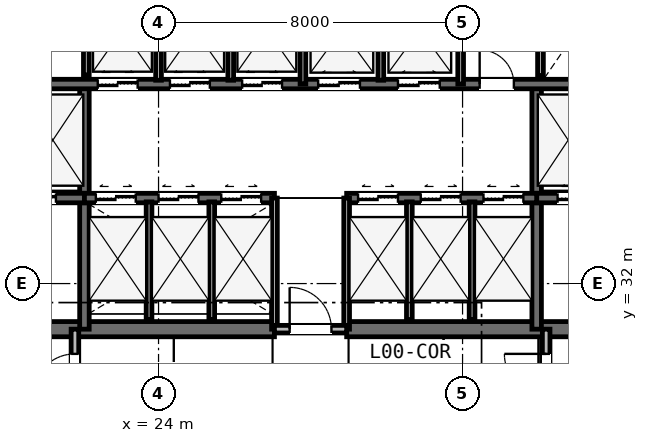
"""IFC4 building model, lengths in metres.
Left out: names, types, materials, properties, quantities, classifications, styles, units other than length and angle.
Written with IfcOpenShell. Run it as: python <this file> out.ifc"""

import sys

from ifc_helpers import new_model, si_unit, direction, frame, frame_2d, origin, place, context, subcontext, project, spatial, rectangle, extrude, element, fill, save


model = new_model("IFC4")
c1 = context("Model", 3, precision=1e-05, world=origin(), true_north=direction((0.0, 1.0)))
c2 = subcontext(c1, "Body", "Model", "MODEL_VIEW")
j1 = project(units=[si_unit("LENGTHUNIT", "METRE"), si_unit("PLANEANGLEUNIT", "RADIAN")], contexts=[c1])
p1 = place(None, origin())
s1 = spatial("IfcSite", under=j1, at=p1, CompositionType="ELEMENT")
p2 = place(p1, origin())
s2 = spatial("IfcBuilding", under=s1, at=p2, CompositionType="ELEMENT")
p3 = place(p2, origin())
s3 = spatial("IfcBuildingStorey", under=s2, at=p3, CompositionType="ELEMENT", Elevation=0.0)
p4 = place(p3, frame((15.85, 30.8, 0.0), z_axis=(0.0, 0.0, 1.0), x_axis=(1.0, 0.0, 0.0)))
e1 = element("IfcWall", 1, at=p4, inside=s3, PredefinedType="SHEAR", context=c2, shape_type="SweptSolid", body=[
    extrude(rectangle(XDim=11.2, YDim=0.4, at=frame_2d((5.6, 0.0))), origin(), (0.0, 0.0, 1.0), 6.0),
])
p5 = place(p4, frame((2.45, 0.0, 0.0)))
e2 = element("IfcOpeningElement", 2, at=p5, cuts=e1, PredefinedType="OPENING", context=c2, shape_type="SweptSolid", body=[
    extrude(rectangle(XDim=1.1, YDim=2.15, at=frame_2d((0.55, 1.075))), frame((0.0, 0.21, 0.0), z_axis=(0.0, -1.0, 0.0), x_axis=(1.0, 0.0, 0.0)), (0.0, 0.0, 1.0), 0.42),
])
p6 = place(p3, frame((28.95, 30.8, 0.0), z_axis=(0.0, 0.0, 1.0), x_axis=(1.0, 0.0, 0.0)))
e3 = element("IfcWall", 3, at=p6, inside=s3, PredefinedType="SHEAR", context=c2, shape_type="SweptSolid", body=[
    extrude(rectangle(XDim=11.2, YDim=0.4, at=frame_2d((5.6, 0.0))), origin(), (0.0, 0.0, 1.0), 6.0),
])
p7 = place(p6, frame((7.65, 0.0, 0.0)))
e4 = element("IfcOpeningElement", 4, at=p7, cuts=e3, PredefinedType="OPENING", context=c2, shape_type="SweptSolid", body=[
    extrude(rectangle(XDim=1.1, YDim=2.15, at=frame_2d((0.55, 1.075))), frame((0.0, 0.21, 0.0), z_axis=(0.0, -1.0, 0.0), x_axis=(1.0, 0.0, 0.0)), (0.0, 0.0, 1.0), 0.42),
])
for number, where, z_axis, x_axis in (
    (5, (22.05, 30.8, 0.0), (0.0, 0.0, 1.0), (0.0, 1.0, 0.0)),
    (6, (33.95, 30.8, 0.0), (0.0, 0.0, 1.0), (0.0, 1.0, 0.0)),
):
    element("IfcWall", number, at=place(p3, frame(where, z_axis=z_axis, x_axis=x_axis)), inside=s3, PredefinedType="SHEAR", context=c2, shape_type="SweptSolid", body=[
        extrude(rectangle(XDim=6.45, YDim=0.25, at=frame_2d((3.225, 0.0))), origin(), (0.0, 0.0, 1.0), 6.0),
    ])
p8 = place(p3, frame((16.0, 34.25, 0.0), z_axis=(0.0, 0.0, 1.0), x_axis=(1.0, 0.0, 0.0)))
e7 = element("IfcWall", 7, at=p8, inside=s3, PredefinedType="SHEAR", context=c2, shape_type="SweptSolid", body=[
    extrude(rectangle(XDim=6.05, YDim=0.25, at=frame_2d((3.025, 0.0))), origin(), (0.0, 0.0, 1.0), 6.0),
])
p9 = place(p8, frame((1.25, 0.0, 0.0)))
e8 = element("IfcOpeningElement", 8, at=p9, cuts=e7, PredefinedType="OPENING", context=c2, shape_type="SweptSolid", body=[
    extrude(rectangle(XDim=1.0, YDim=2.15, at=frame_2d((0.5, 1.075))), frame((0.0, 0.135, 0.0), z_axis=(0.0, -1.0, 0.0), x_axis=(1.0, 0.0, 0.0)), (0.0, 0.0, 1.0), 0.27),
])
p10 = place(p8, frame((4.2, 0.0, 0.0)))
e9 = element("IfcOpeningElement", 9, at=p10, cuts=e7, PredefinedType="OPENING", context=c2, shape_type="SweptSolid", body=[
    extrude(rectangle(XDim=1.1, YDim=2.15, at=frame_2d((0.55, 1.075))), frame((0.0, 0.135, 0.0), z_axis=(0.0, -1.0, 0.0), x_axis=(1.0, 0.0, 0.0)), (0.0, 0.0, 1.0), 0.27),
])
p11 = place(p3, frame((33.95, 34.25, 0.0), z_axis=(0.0, 0.0, 1.0), x_axis=(1.0, 0.0, 0.0)))
e10 = element("IfcWall", 10, at=p11, inside=s3, PredefinedType="SHEAR", context=c2, shape_type="SweptSolid", body=[
    extrude(rectangle(XDim=6.05, YDim=0.25, at=frame_2d((3.025, 0.0))), origin(), (0.0, 0.0, 1.0), 6.0),
])
p12 = place(p11, frame((3.7, 0.0, 0.0)))
e11 = element("IfcOpeningElement", 11, at=p12, cuts=e10, PredefinedType="OPENING", context=c2, shape_type="SweptSolid", body=[
    extrude(rectangle(XDim=1.0, YDim=2.15, at=frame_2d((0.5, 1.075))), frame((0.0, 0.135, 0.0), z_axis=(0.0, -1.0, 0.0), x_axis=(1.0, 0.0, 0.0)), (0.0, 0.0, 1.0), 0.27),
])
p13 = place(p11, frame((0.55, 0.0, 0.0)))
e12 = element("IfcOpeningElement", 12, at=p13, cuts=e10, PredefinedType="OPENING", context=c2, shape_type="SweptSolid", body=[
    extrude(rectangle(XDim=1.1, YDim=2.15, at=frame_2d((0.55, 1.075))), frame((0.0, 0.135, 0.0), z_axis=(0.0, -1.0, 0.0), x_axis=(1.0, 0.0, 0.0)), (0.0, 0.0, 1.0), 0.27),
])
p14 = place(p3, frame((22.05, 34.25, 0.0), z_axis=(0.0, 0.0, 1.0), x_axis=(1.0, 0.0, 0.0)))
e13 = element("IfcWall", 13, at=p14, inside=s3, PredefinedType="SHEAR", context=c2, shape_type="SweptSolid", body=[
    extrude(rectangle(XDim=5.0, YDim=0.25, at=frame_2d((2.5, 0.0))), origin(), (0.0, 0.0, 1.0), 6.0),
])
p15 = place(p14, frame((0.3, 0.0, 0.0)))
e14 = element("IfcOpeningElement", 14, at=p15, cuts=e13, PredefinedType="OPENING", context=c2, shape_type="SweptSolid", body=[
    extrude(rectangle(XDim=1.05, YDim=2.15, at=frame_2d((0.525, 1.075))), frame((0.0, 0.135, 0.0), z_axis=(0.0, -1.0, 0.0), x_axis=(1.0, 0.0, 0.0)), (0.0, 0.0, 1.0), 0.27),
])
p16 = place(p14, frame((1.95, 0.0, 0.0)))
e15 = element("IfcOpeningElement", 15, at=p16, cuts=e13, PredefinedType="OPENING", context=c2, shape_type="SweptSolid", body=[
    extrude(rectangle(XDim=1.05, YDim=2.15, at=frame_2d((0.525, 1.075))), frame((0.0, 0.135, 0.0), z_axis=(0.0, -1.0, 0.0), x_axis=(1.0, 0.0, 0.0)), (0.0, 0.0, 1.0), 0.27),
])
p17 = place(p14, frame((3.6, 0.0, 0.0)))
e16 = element("IfcOpeningElement", 16, at=p17, cuts=e13, PredefinedType="OPENING", context=c2, shape_type="SweptSolid", body=[
    extrude(rectangle(XDim=1.05, YDim=2.15, at=frame_2d((0.525, 1.075))), frame((0.0, 0.135, 0.0), z_axis=(0.0, -1.0, 0.0), x_axis=(1.0, 0.0, 0.0)), (0.0, 0.0, 1.0), 0.27),
])
p18 = place(p3, frame((28.95, 34.25, 0.0), z_axis=(0.0, 0.0, 1.0), x_axis=(1.0, 0.0, 0.0)))
e17 = element("IfcWall", 17, at=p18, inside=s3, PredefinedType="SHEAR", context=c2, shape_type="SweptSolid", body=[
    extrude(rectangle(XDim=5.0, YDim=0.25, at=frame_2d((2.5, 0.0))), origin(), (0.0, 0.0, 1.0), 6.0),
])
p19 = place(p18, frame((0.3, 0.0, 0.0)))
e18 = element("IfcOpeningElement", 18, at=p19, cuts=e17, PredefinedType="OPENING", context=c2, shape_type="SweptSolid", body=[
    extrude(rectangle(XDim=1.05, YDim=2.15, at=frame_2d((0.525, 1.075))), frame((0.0, 0.135, 0.0), z_axis=(0.0, -1.0, 0.0), x_axis=(1.0, 0.0, 0.0)), (0.0, 0.0, 1.0), 0.27),
])
p20 = place(p18, frame((1.95, 0.0, 0.0)))
e19 = element("IfcOpeningElement", 19, at=p20, cuts=e17, PredefinedType="OPENING", context=c2, shape_type="SweptSolid", body=[
    extrude(rectangle(XDim=1.05, YDim=2.15, at=frame_2d((0.525, 1.075))), frame((0.0, 0.135, 0.0), z_axis=(0.0, -1.0, 0.0), x_axis=(1.0, 0.0, 0.0)), (0.0, 0.0, 1.0), 0.27),
])
p21 = place(p18, frame((3.6, 0.0, 0.0)))
e20 = element("IfcOpeningElement", 20, at=p21, cuts=e17, PredefinedType="OPENING", context=c2, shape_type="SweptSolid", body=[
    extrude(rectangle(XDim=1.05, YDim=2.15, at=frame_2d((0.525, 1.075))), frame((0.0, 0.135, 0.0), z_axis=(0.0, -1.0, 0.0), x_axis=(1.0, 0.0, 0.0)), (0.0, 0.0, 1.0), 0.27),
])
p22 = place(p3, frame((19.9, 37.25, 0.0), z_axis=(0.0, 0.0, 1.0), x_axis=(1.0, 0.0, 0.0)))
e21 = element("IfcWall", 21, at=p22, inside=s3, PredefinedType="SHEAR", context=c2, shape_type="SweptSolid", body=[
    extrude(rectangle(XDim=16.2, YDim=0.25, at=frame_2d((8.1, 0.0))), origin(), (0.0, 0.0, 1.0), 6.0),
])
p23 = place(p22, frame((12.55, 0.0, 0.0)))
e22 = element("IfcOpeningElement", 22, at=p23, cuts=e21, PredefinedType="OPENING", context=c2, shape_type="SweptSolid", body=[
    extrude(rectangle(XDim=0.9, YDim=2.15, at=frame_2d((0.45, 1.075))), frame((0.0, 0.135, 0.0), z_axis=(0.0, -1.0, 0.0), x_axis=(1.0, 0.0, 0.0)), (0.0, 0.0, 1.0), 0.27),
])
p24 = place(p22, frame((2.5, 0.0, 0.0)))
e23 = element("IfcOpeningElement", 23, at=p24, cuts=e21, PredefinedType="OPENING", context=c2, shape_type="SweptSolid", body=[
    extrude(rectangle(XDim=1.05, YDim=2.15, at=frame_2d((0.525, 1.075))), frame((0.0, 0.135, 0.0), z_axis=(0.0, -1.0, 0.0), x_axis=(1.0, 0.0, 0.0)), (0.0, 0.0, 1.0), 0.27),
])
p25 = place(p22, frame((4.4, 0.0, 0.0)))
e24 = element("IfcOpeningElement", 24, at=p25, cuts=e21, PredefinedType="OPENING", context=c2, shape_type="SweptSolid", body=[
    extrude(rectangle(XDim=1.05, YDim=2.15, at=frame_2d((0.525, 1.075))), frame((0.0, 0.135, 0.0), z_axis=(0.0, -1.0, 0.0), x_axis=(1.0, 0.0, 0.0)), (0.0, 0.0, 1.0), 0.27),
])
p26 = place(p22, frame((6.3, 0.0, 0.0)))
e25 = element("IfcOpeningElement", 25, at=p26, cuts=e21, PredefinedType="OPENING", context=c2, shape_type="SweptSolid", body=[
    extrude(rectangle(XDim=1.05, YDim=2.15, at=frame_2d((0.525, 1.075))), frame((0.0, 0.135, 0.0), z_axis=(0.0, -1.0, 0.0), x_axis=(1.0, 0.0, 0.0)), (0.0, 0.0, 1.0), 0.27),
])
p27 = place(p22, frame((8.3, 0.0, 0.0)))
e26 = element("IfcOpeningElement", 26, at=p27, cuts=e21, PredefinedType="OPENING", context=c2, shape_type="SweptSolid", body=[
    extrude(rectangle(XDim=1.1, YDim=2.15, at=frame_2d((0.55, 1.075))), frame((0.0, 0.135, 0.0), z_axis=(0.0, -1.0, 0.0), x_axis=(1.0, 0.0, 0.0)), (0.0, 0.0, 1.0), 0.27),
])
p28 = place(p22, frame((10.4, 0.0, 0.0)))
e27 = element("IfcOpeningElement", 27, at=p28, cuts=e21, PredefinedType="OPENING", context=c2, shape_type="SweptSolid", body=[
    extrude(rectangle(XDim=1.1, YDim=2.15, at=frame_2d((0.55, 1.075))), frame((0.0, 0.135, 0.0), z_axis=(0.0, -1.0, 0.0), x_axis=(1.0, 0.0, 0.0)), (0.0, 0.0, 1.0), 0.27),
])
for number, where, z_axis, x_axis in (
    (28, (27.05, 30.8, 0.0), (0.0, 0.0, 1.0), (0.0, 1.0, 0.0)),
    (29, (28.95, 30.8, 0.0), (0.0, 0.0, 1.0), (0.0, 1.0, 0.0)),
):
    element("IfcWall", number, at=place(p3, frame(where, z_axis=z_axis, x_axis=x_axis)), inside=s3, PredefinedType="PLUMBINGWALL", context=c2, shape_type="SweptSolid", body=[
        extrude(rectangle(XDim=3.45, YDim=0.15, at=frame_2d((1.725, 0.0))), origin(), (0.0, 0.0, 1.0), 5.41),
    ])
p29 = place(p3, frame((27.05, 30.8, 0.0), z_axis=(0.0, 0.0, 1.0), x_axis=(1.0, 0.0, 0.0)))
e30 = element("IfcWall", 30, at=p29, inside=s3, PredefinedType="PARTITIONING", context=c2, shape_type="SweptSolid", body=[
    extrude(rectangle(XDim=1.9, YDim=0.2, at=frame_2d((0.95, 0.0))), origin(), (0.0, 0.0, 1.0), 5.41),
])
p30 = place(p29, frame((0.4, 0.0, 0.0)))
e31 = element("IfcOpeningElement", 31, at=p30, cuts=e30, PredefinedType="OPENING", context=c2, shape_type="SweptSolid", body=[
    extrude(rectangle(XDim=1.1, YDim=2.15, at=frame_2d((0.55, 1.075))), frame((0.0, 0.11, 0.0), z_axis=(0.0, -1.0, 0.0), x_axis=(1.0, 0.0, 0.0)), (0.0, 0.0, 1.0), 0.22),
])
for number, where, z_axis, x_axis in (
    (32, (23.75, 31.05, 0.0), (0.0, 0.0, 1.0), (0.0, 1.0, 0.0)),
    (33, (25.4, 31.05, 0.0), (0.0, 0.0, 1.0), (0.0, 1.0, 0.0)),
    (34, (30.6, 31.05, 0.0), (0.0, 0.0, 1.0), (0.0, 1.0, 0.0)),
    (35, (32.25, 31.05, 0.0), (0.0, 0.0, 1.0), (0.0, 1.0, 0.0)),
):
    element("IfcWall", number, at=place(p3, frame(where, z_axis=z_axis, x_axis=x_axis)), inside=s3, PredefinedType="PLUMBINGWALL", context=c2, shape_type="SweptSolid", body=[
        extrude(rectangle(XDim=3.1, YDim=0.15, at=frame_2d((1.55, 0.0))), origin(), (0.0, 0.0, 1.0), 5.67),
    ])
p31 = place(p3, frame((22.1, 37.49, 0.0), z_axis=(0.0, 0.0, 1.0), x_axis=(0.0, 1.0, 0.0)))
e36 = element("IfcWall", 36, at=p31, inside=s3, PredefinedType="PLUMBINGWALL", context=c2, shape_type="SweptSolid", body=[
    extrude(rectangle(XDim=2.56, YDim=0.15, at=frame_2d((1.28, 0.0))), origin(), (0.0, 0.0, 1.0), 5.67),
])
p32 = place(p3, frame((27.8, 37.25, 0.0), z_axis=(0.0, 0.0, 1.0), x_axis=(0.0, 1.0, 0.0)))
e37 = element("IfcWall", 37, at=p32, inside=s3, PredefinedType="PLUMBINGWALL", context=c2, shape_type="SweptSolid", body=[
    extrude(rectangle(XDim=2.8, YDim=0.15, at=frame_2d((1.4, 0.0))), origin(), (0.0, 0.0, 1.0), 5.67),
])
for number, where, z_axis, x_axis in (
    (38, (24.0, 37.35, 0.0), (0.0, 0.0, 1.0), (0.0, 1.0, 0.0)),
    (39, (25.9, 37.35, 0.0), (0.0, 0.0, 1.0), (0.0, 1.0, 0.0)),
):
    element("IfcWall", number, at=place(p3, frame(where, z_axis=z_axis, x_axis=x_axis)), inside=s3, PredefinedType="PLUMBINGWALL", context=c2, shape_type="SweptSolid", body=[
        extrude(rectangle(XDim=2.6, YDim=0.15, at=frame_2d((1.3, 0.0))), origin(), (0.0, 0.0, 1.0), 5.67),
    ])
p33 = place(p3, frame((31.95, 37.25, 0.0), z_axis=(0.0, 0.0, 1.0), x_axis=(0.0, 1.0, 0.0)))
e40 = element("IfcWall", 40, at=p33, inside=s3, PredefinedType="PLUMBINGWALL", context=c2, shape_type="SweptSolid", body=[
    extrude(rectangle(XDim=2.8, YDim=0.15, at=frame_2d((1.4, 0.0))), origin(), (0.0, 0.0, 1.0), 5.67),
])
p34 = place(p3, frame((29.85, 37.35, 0.0), z_axis=(0.0, 0.0, 1.0), x_axis=(0.0, 1.0, 0.0)))
e41 = element("IfcWall", 41, at=p34, inside=s3, PredefinedType="PLUMBINGWALL", context=c2, shape_type="SweptSolid", body=[
    extrude(rectangle(XDim=2.6, YDim=0.15, at=frame_2d((1.3, 0.0))), origin(), (0.0, 0.0, 1.0), 5.67),
])
p35 = place(p3, frame((34.05, 37.473, 0.0), z_axis=(0.0, 0.0, 1.0), x_axis=(0.0, 1.0, 0.0)))
e42 = element("IfcWall", 42, at=p35, inside=s3, PredefinedType="PLUMBINGWALL", context=c2, shape_type="SweptSolid", body=[
    extrude(rectangle(XDim=2.577, YDim=0.15, at=frame_2d((1.288, 0.0))), origin(), (0.0, 0.0, 1.0), 5.67),
])
p36 = place(p3, frame((21.8, 28.4, 0.0), z_axis=(0.0, 0.0, 1.0), x_axis=(0.0, 1.0, 0.0)))
e43 = element("IfcWall", 43, at=p36, inside=s3, PredefinedType="PARTITIONING", context=c2, shape_type="SweptSolid", body=[
    extrude(rectangle(XDim=2.4, YDim=0.2, at=frame_2d((1.2, 0.0))), origin(), (0.0, 0.0, 1.0), 5.26),
])
p37 = place(p36, frame((0.65, 0.0, 0.0)))
e44 = element("IfcOpeningElement", 44, at=p37, cuts=e43, PredefinedType="OPENING", context=c2, shape_type="SweptSolid", body=[
    extrude(rectangle(XDim=1.1, YDim=2.15, at=frame_2d((0.55, 1.075))), frame((0.0, 0.11, 0.0), z_axis=(0.0, -1.0, 0.0), x_axis=(1.0, 0.0, 0.0)), (0.0, 0.0, 1.0), 0.22),
])
p38 = place(p3, frame((34.2, 28.4, 0.0), z_axis=(0.0, 0.0, 1.0), x_axis=(0.0, 1.0, 0.0)))
e45 = element("IfcWall", 45, at=p38, inside=s3, PredefinedType="PARTITIONING", context=c2, shape_type="SweptSolid", body=[
    extrude(rectangle(XDim=2.4, YDim=0.2, at=frame_2d((1.2, 0.0))), origin(), (0.0, 0.0, 1.0), 5.26),
])
p39 = place(p38, frame((0.65, 0.0, 0.0)))
e46 = element("IfcOpeningElement", 46, at=p39, cuts=e45, PredefinedType="OPENING", context=c2, shape_type="SweptSolid", body=[
    extrude(rectangle(XDim=1.1, YDim=2.15, at=frame_2d((0.55, 1.075))), frame((0.0, 0.11, 0.0), z_axis=(0.0, -1.0, 0.0), x_axis=(1.0, 0.0, 0.0)), (0.0, 0.0, 1.0), 0.22),
])
p40 = place(p30, origin())
e47 = element("IfcDoor", 47, at=p40, inside=s3, OperationType="SINGLE_SWING_LEFT", PredefinedType="DOOR", context=c2, shape_type="SweptSolid", body=[
    extrude(rectangle(XDim=1.1, YDim=2.15, at=frame_2d((0.55, 1.075))), frame((0.0, 0.025, 0.0), z_axis=(0.0, -1.0, 0.0), x_axis=(1.0, 0.0, 0.0)), (0.0, 0.0, 1.0), 0.05),
])
fill(e31, e47)
p41 = place(p23, origin())
e48 = element("IfcDoor", 48, at=p41, inside=s3, OperationType="SINGLE_SWING_LEFT", PredefinedType="DOOR", context=c2, shape_type="SweptSolid", body=[
    extrude(rectangle(XDim=0.9, YDim=2.15, at=frame_2d((0.45, 1.075))), frame((0.0, 0.025, 0.0), z_axis=(0.0, -1.0, 0.0), x_axis=(1.0, 0.0, 0.0)), (0.0, 0.0, 1.0), 0.05),
])
fill(e22, e48)
p42 = place(p37, origin())
e49 = element("IfcDoor", 49, at=p42, inside=s3, OperationType="SINGLE_SWING_LEFT", PredefinedType="DOOR", context=c2, shape_type="SweptSolid", body=[
    extrude(rectangle(XDim=1.1, YDim=2.15, at=frame_2d((0.55, 1.075))), frame((0.0, 0.025, 0.0), z_axis=(0.0, -1.0, 0.0), x_axis=(1.0, 0.0, 0.0)), (0.0, 0.0, 1.0), 0.05),
])
fill(e44, e49)
p43 = place(p39, origin())
e50 = element("IfcDoor", 50, at=p43, inside=s3, OperationType="SINGLE_SWING_RIGHT", PredefinedType="DOOR", context=c2, shape_type="SweptSolid", body=[
    extrude(rectangle(XDim=1.1, YDim=2.15, at=frame_2d((0.55, 1.075))), frame((0.0, 0.025, 0.0), z_axis=(0.0, -1.0, 0.0), x_axis=(1.0, 0.0, 0.0)), (0.0, 0.0, 1.0), 0.05),
])
fill(e46, e50)
p44 = place(p10, origin())
e51 = element("IfcDoor", 51, at=p44, inside=s3, OperationType="DOUBLE_DOOR_SLIDING", PredefinedType="DOOR", context=c2, shape_type="SweptSolid", body=[
    extrude(rectangle(XDim=1.1, YDim=2.15, at=frame_2d((0.55, 1.075))), frame((0.0, 0.025, 0.0), z_axis=(0.0, -1.0, 0.0), x_axis=(1.0, 0.0, 0.0)), (0.0, 0.0, 1.0), 0.05),
])
fill(e9, e51)
p45 = place(p13, origin())
e52 = element("IfcDoor", 52, at=p45, inside=s3, OperationType="DOUBLE_DOOR_SLIDING", PredefinedType="DOOR", context=c2, shape_type="SweptSolid", body=[
    extrude(rectangle(XDim=1.1, YDim=2.15, at=frame_2d((0.55, 1.075))), frame((0.0, 0.025, 0.0), z_axis=(0.0, -1.0, 0.0), x_axis=(1.0, 0.0, 0.0)), (0.0, 0.0, 1.0), 0.05),
])
fill(e12, e52)
p46 = place(p15, origin())
e53 = element("IfcDoor", 53, at=p46, inside=s3, OperationType="DOUBLE_DOOR_SLIDING", PredefinedType="DOOR", context=c2, shape_type="SweptSolid", body=[
    extrude(rectangle(XDim=1.05, YDim=2.15, at=frame_2d((0.525, 1.075))), frame((0.0, 0.025, 0.0), z_axis=(0.0, -1.0, 0.0), x_axis=(1.0, 0.0, 0.0)), (0.0, 0.0, 1.0), 0.05),
])
fill(e14, e53)
p47 = place(p16, origin())
e54 = element("IfcDoor", 54, at=p47, inside=s3, OperationType="DOUBLE_DOOR_SLIDING", PredefinedType="DOOR", context=c2, shape_type="SweptSolid", body=[
    extrude(rectangle(XDim=1.05, YDim=2.15, at=frame_2d((0.525, 1.075))), frame((0.0, 0.025, 0.0), z_axis=(0.0, -1.0, 0.0), x_axis=(1.0, 0.0, 0.0)), (0.0, 0.0, 1.0), 0.05),
])
fill(e15, e54)
p48 = place(p17, origin())
e55 = element("IfcDoor", 55, at=p48, inside=s3, OperationType="DOUBLE_DOOR_SLIDING", PredefinedType="DOOR", context=c2, shape_type="SweptSolid", body=[
    extrude(rectangle(XDim=1.05, YDim=2.15, at=frame_2d((0.525, 1.075))), frame((0.0, 0.025, 0.0), z_axis=(0.0, -1.0, 0.0), x_axis=(1.0, 0.0, 0.0)), (0.0, 0.0, 1.0), 0.05),
])
fill(e16, e55)
p49 = place(p19, origin())
e56 = element("IfcDoor", 56, at=p49, inside=s3, OperationType="DOUBLE_DOOR_SLIDING", PredefinedType="DOOR", context=c2, shape_type="SweptSolid", body=[
    extrude(rectangle(XDim=1.05, YDim=2.15, at=frame_2d((0.525, 1.075))), frame((0.0, 0.025, 0.0), z_axis=(0.0, -1.0, 0.0), x_axis=(1.0, 0.0, 0.0)), (0.0, 0.0, 1.0), 0.05),
])
fill(e18, e56)
p50 = place(p20, origin())
e57 = element("IfcDoor", 57, at=p50, inside=s3, OperationType="DOUBLE_DOOR_SLIDING", PredefinedType="DOOR", context=c2, shape_type="SweptSolid", body=[
    extrude(rectangle(XDim=1.05, YDim=2.15, at=frame_2d((0.525, 1.075))), frame((0.0, 0.025, 0.0), z_axis=(0.0, -1.0, 0.0), x_axis=(1.0, 0.0, 0.0)), (0.0, 0.0, 1.0), 0.05),
])
fill(e19, e57)
p51 = place(p21, origin())
e58 = element("IfcDoor", 58, at=p51, inside=s3, OperationType="DOUBLE_DOOR_SLIDING", PredefinedType="DOOR", context=c2, shape_type="SweptSolid", body=[
    extrude(rectangle(XDim=1.05, YDim=2.15, at=frame_2d((0.525, 1.075))), frame((0.0, 0.025, 0.0), z_axis=(0.0, -1.0, 0.0), x_axis=(1.0, 0.0, 0.0)), (0.0, 0.0, 1.0), 0.05),
])
fill(e20, e58)
p52 = place(p24, origin())
e59 = element("IfcDoor", 59, at=p52, inside=s3, OperationType="DOUBLE_DOOR_SLIDING", PredefinedType="DOOR", context=c2, shape_type="SweptSolid", body=[
    extrude(rectangle(XDim=1.05, YDim=2.15, at=frame_2d((0.525, 1.075))), frame((0.0, 0.025, 0.0), z_axis=(0.0, -1.0, 0.0), x_axis=(1.0, 0.0, 0.0)), (0.0, 0.0, 1.0), 0.05),
])
fill(e23, e59)
p53 = place(p25, origin())
e60 = element("IfcDoor", 60, at=p53, inside=s3, OperationType="DOUBLE_DOOR_SLIDING", PredefinedType="DOOR", context=c2, shape_type="SweptSolid", body=[
    extrude(rectangle(XDim=1.05, YDim=2.15, at=frame_2d((0.525, 1.075))), frame((0.0, 0.025, 0.0), z_axis=(0.0, -1.0, 0.0), x_axis=(1.0, 0.0, 0.0)), (0.0, 0.0, 1.0), 0.05),
])
fill(e24, e60)
p54 = place(p26, origin())
e61 = element("IfcDoor", 61, at=p54, inside=s3, OperationType="DOUBLE_DOOR_SLIDING", PredefinedType="DOOR", context=c2, shape_type="SweptSolid", body=[
    extrude(rectangle(XDim=1.05, YDim=2.15, at=frame_2d((0.525, 1.075))), frame((0.0, 0.025, 0.0), z_axis=(0.0, -1.0, 0.0), x_axis=(1.0, 0.0, 0.0)), (0.0, 0.0, 1.0), 0.05),
])
fill(e25, e61)
p55 = place(p27, origin())
e62 = element("IfcDoor", 62, at=p55, inside=s3, OperationType="DOUBLE_DOOR_SLIDING", PredefinedType="DOOR", context=c2, shape_type="SweptSolid", body=[
    extrude(rectangle(XDim=1.1, YDim=2.15, at=frame_2d((0.55, 1.075))), frame((0.0, 0.025, 0.0), z_axis=(0.0, -1.0, 0.0), x_axis=(1.0, 0.0, 0.0)), (0.0, 0.0, 1.0), 0.05),
])
fill(e26, e62)
p56 = place(p28, origin())
e63 = element("IfcDoor", 63, at=p56, inside=s3, OperationType="DOUBLE_DOOR_SLIDING", PredefinedType="DOOR", context=c2, shape_type="SweptSolid", body=[
    extrude(rectangle(XDim=1.1, YDim=2.15, at=frame_2d((0.55, 1.075))), frame((0.0, 0.025, 0.0), z_axis=(0.0, -1.0, 0.0), x_axis=(1.0, 0.0, 0.0)), (0.0, 0.0, 1.0), 0.05),
])
fill(e27, e63)
save(model, sys.argv[1])
